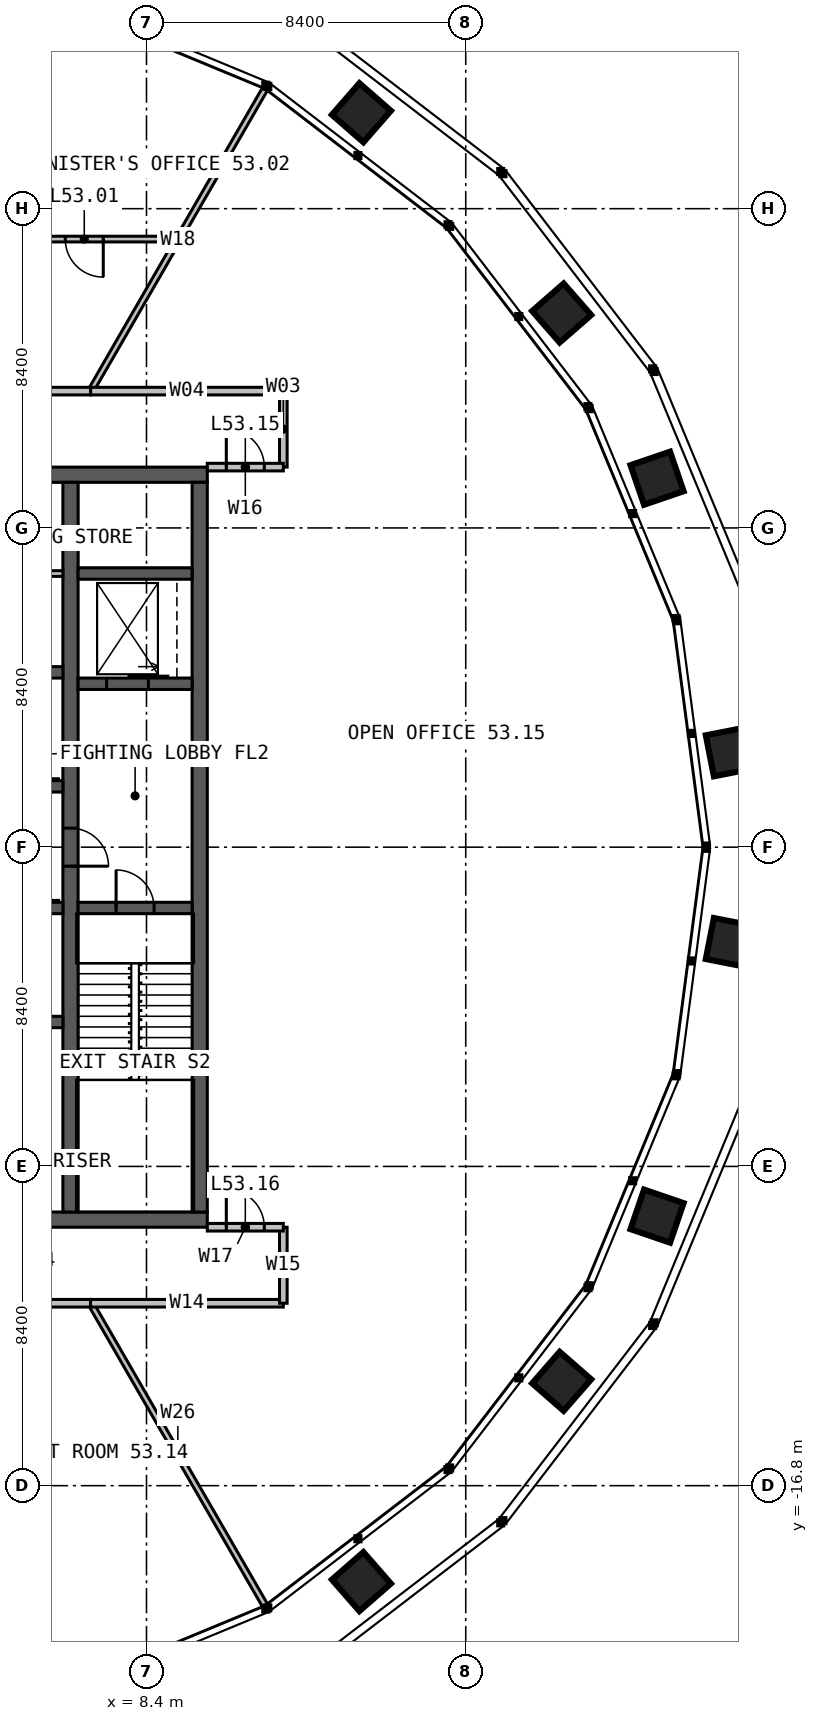
"""IFC4 building model, lengths in metres.
Left out: names, types, materials, properties, quantities, classifications, styles, units other than length and angle.
Written with IfcOpenShell. Run it as: python <this file> out.ifc"""

import sys

from ifc_helpers import new_model, si_unit, direction, frame, frame_2d, origin, place, context, subcontext, project, spatial, rectangle, extrude, element, fill, save


model = new_model("IFC4")
c1 = context("Model", 3, precision=1e-05, world=origin(), true_north=direction((0.0, 1.0)))
c2 = subcontext(c1, "Body", "Model", "MODEL_VIEW")
j1 = project(units=[si_unit("LENGTHUNIT", "METRE"), si_unit("PLANEANGLEUNIT", "RADIAN")], contexts=[c1])
p1 = place(None, origin())
s1 = spatial("IfcSite", under=j1, at=p1, CompositionType="ELEMENT")
p2 = place(p1, origin())
s2 = spatial("IfcBuilding", under=s1, at=p2, CompositionType="ELEMENT")
p3 = place(p2, frame((0.0, 0.0, 220.0)))
s3 = spatial("IfcBuildingStorey", under=s2, at=p3, CompositionType="ELEMENT", Elevation=220.0)
p4 = place(p3, frame((-10.0, 9.8, 0.0), z_axis=(0.0, 0.0, 1.0), x_axis=(1.0, 0.0, 0.0)))
e1 = element("IfcWall", 1, at=p4, inside=s3, PredefinedType="SOLIDWALL", context=c2, shape_type="SweptSolid", body=[
    extrude(rectangle(XDim=20.0, YDim=0.4, at=frame_2d((10.0, 0.0))), origin(), (0.0, 0.0, 1.0), 4.0),
])
p5 = place(p4, frame((9.4, 0.0, 0.0)))
e2 = element("IfcOpeningElement", 2, at=p5, cuts=e1, PredefinedType="OPENING", context=c2, shape_type="SweptSolid", body=[
    extrude(rectangle(XDim=1.2, YDim=2.2, at=frame_2d((0.6, 1.1))), frame((0.0, 0.21, 0.0), z_axis=(0.0, -1.0, 0.0), x_axis=(1.0, 0.0, 0.0)), (0.0, 0.0, 1.0), 0.42),
])
p6 = place(p3, frame((10.0, -9.8, 0.0), z_axis=(0.0, 0.0, 1.0), x_axis=(-1.0, 0.0, 0.0)))
e3 = element("IfcWall", 3, at=p6, inside=s3, PredefinedType="SOLIDWALL", context=c2, shape_type="SweptSolid", body=[
    extrude(rectangle(XDim=20.0, YDim=0.4, at=frame_2d((10.0, 0.0))), origin(), (0.0, 0.0, 1.0), 4.0),
])
p7 = place(p6, frame((6.875, 0.0, 0.0)))
e4 = element("IfcOpeningElement", 4, at=p7, cuts=e3, PredefinedType="OPENING", context=c2, shape_type="SweptSolid", body=[
    extrude(rectangle(XDim=1.2, YDim=2.2, at=frame_2d((0.6, 1.1))), frame((0.0, 0.21, 0.0), z_axis=(0.0, -1.0, 0.0), x_axis=(1.0, 0.0, 0.0)), (0.0, 0.0, 1.0), 0.42),
])
p8 = place(p3, frame((9.8, -9.6, 0.0), z_axis=(0.0, 0.0, 1.0), x_axis=(0.0, 1.0, 0.0)))
e5 = element("IfcWall", 5, at=p8, inside=s3, PredefinedType="SOLIDWALL", context=c2, shape_type="SweptSolid", body=[
    extrude(rectangle(XDim=19.2, YDim=0.4, at=frame_2d((9.6, 0.0))), origin(), (0.0, 0.0, 1.0), 4.0),
])
p9 = place(p3, frame((6.4, 9.6, 0.0), z_axis=(0.0, 0.0, 1.0), x_axis=(0.0, -1.0, 0.0)))
e6 = element("IfcWall", 6, at=p9, inside=s3, PredefinedType="SOLIDWALL", context=c2, shape_type="SweptSolid", body=[
    extrude(rectangle(XDim=19.2, YDim=0.4, at=frame_2d((9.6, 0.0))), origin(), (0.0, 0.0, 1.0), 4.0),
])
p10 = place(p9, frame((9.1, 0.0, 0.0)))
e7 = element("IfcOpeningElement", 7, at=p10, cuts=e6, PredefinedType="OPENING", context=c2, shape_type="SweptSolid", body=[
    extrude(rectangle(XDim=1.0, YDim=2.2, at=frame_2d((0.5, 1.1))), frame((0.0, 0.21, 0.0), z_axis=(0.0, -1.0, 0.0), x_axis=(1.0, 0.0, 0.0)), (0.0, 0.0, 1.0), 0.42),
])
p11 = place(p3, frame((1.35, 1.6, 0.0), z_axis=(0.0, 0.0, 1.0), x_axis=(1.0, 0.0, 0.0)))
e8 = element("IfcWall", 8, at=p11, inside=s3, PredefinedType="SOLIDWALL", context=c2, shape_type="SweptSolid", body=[
    extrude(rectangle(XDim=4.85, YDim=0.3, at=frame_2d((2.425, 0.0))), origin(), (0.0, 0.0, 1.0), 4.0),
])
p12 = place(p11, frame((0.6, 0.0, 0.0)))
e9 = element("IfcOpeningElement", 9, at=p12, cuts=e8, PredefinedType="OPENING", context=c2, shape_type="SweptSolid", body=[
    extrude(rectangle(XDim=1.1, YDim=2.2, at=frame_2d((0.55, 1.1))), frame((0.0, 0.16, 0.0), z_axis=(0.0, -1.0, 0.0), x_axis=(1.0, 0.0, 0.0)), (0.0, 0.0, 1.0), 0.32),
])
p13 = place(p11, frame((3.125, 0.0, 0.0)))
e10 = element("IfcOpeningElement", 10, at=p13, cuts=e8, PredefinedType="OPENING", context=c2, shape_type="SweptSolid", body=[
    extrude(rectangle(XDim=1.1, YDim=2.2, at=frame_2d((0.55, 1.1))), frame((0.0, 0.16, 0.0), z_axis=(0.0, -1.0, 0.0), x_axis=(1.0, 0.0, 0.0)), (0.0, 0.0, 1.0), 0.32),
])
p14 = place(p3, frame((1.35, 4.6, 0.0), z_axis=(0.0, 0.0, 1.0), x_axis=(1.0, 0.0, 0.0)))
e11 = element("IfcWall", 11, at=p14, inside=s3, PredefinedType="SOLIDWALL", context=c2, shape_type="SweptSolid", body=[
    extrude(rectangle(XDim=4.85, YDim=0.3, at=frame_2d((2.425, 0.0))), origin(), (0.0, 0.0, 1.0), 4.0),
])
p15 = place(p3, frame((3.85, -1.6, 0.0), z_axis=(0.0, 0.0, 1.0), x_axis=(1.0, 0.0, 0.0)))
e12 = element("IfcWall", 12, at=p15, inside=s3, PredefinedType="SOLIDWALL", context=c2, shape_type="SweptSolid", body=[
    extrude(rectangle(XDim=2.35, YDim=0.3, at=frame_2d((1.175, 0.0))), origin(), (0.0, 0.0, 1.0), 4.0),
])
p16 = place(p15, frame((0.625, 0.0, 0.0)))
e13 = element("IfcOpeningElement", 13, at=p16, cuts=e12, PredefinedType="OPENING", context=c2, shape_type="SweptSolid", body=[
    extrude(rectangle(XDim=1.1, YDim=2.2, at=frame_2d((0.55, 1.1))), frame((0.0, 0.16, 0.0), z_axis=(0.0, -1.0, 0.0), x_axis=(1.0, 0.0, 0.0)), (0.0, 0.0, 1.0), 0.32),
])
p17 = place(p3, frame((3.85, -4.6, 0.0), z_axis=(0.0, 0.0, 1.0), x_axis=(1.0, 0.0, 0.0)))
e14 = element("IfcWall", 14, at=p17, inside=s3, PredefinedType="SOLIDWALL", context=c2, shape_type="SweptSolid", body=[
    extrude(rectangle(XDim=2.35, YDim=0.3, at=frame_2d((1.175, 0.0))), origin(), (0.0, 0.0, 1.0), 4.0),
])
p18 = place(p3, frame((6.6, -1.6, 0.0), z_axis=(0.0, 0.0, 1.0), x_axis=(1.0, 0.0, 0.0)))
e15 = element("IfcWall", 15, at=p18, inside=s3, PredefinedType="SOLIDWALL", context=c2, shape_type="SweptSolid", body=[
    extrude(rectangle(XDim=3.0, YDim=0.3, at=frame_2d((1.5, 0.0))), origin(), (0.0, 0.0, 1.0), 4.0),
])
p19 = place(p18, frame((1.0, 0.0, 0.0)))
e16 = element("IfcOpeningElement", 16, at=p19, cuts=e15, PredefinedType="OPENING", context=c2, shape_type="SweptSolid", body=[
    extrude(rectangle(XDim=1.0, YDim=2.2, at=frame_2d((0.5, 1.1))), frame((0.0, 0.16, 0.0), z_axis=(0.0, -1.0, 0.0), x_axis=(1.0, 0.0, 0.0)), (0.0, 0.0, 1.0), 0.32),
])
p20 = place(p3, frame((6.6, 4.3, 0.0), z_axis=(0.0, 0.0, 1.0), x_axis=(1.0, 0.0, 0.0)))
e17 = element("IfcWall", 17, at=p20, inside=s3, PredefinedType="SOLIDWALL", context=c2, shape_type="SweptSolid", body=[
    extrude(rectangle(XDim=3.0, YDim=0.3, at=frame_2d((1.5, 0.0))), origin(), (0.0, 0.0, 1.0), 4.0),
])
p21 = place(p20, frame((0.75, 0.0, 0.0)))
e18 = element("IfcOpeningElement", 18, at=p21, cuts=e17, PredefinedType="OPENING", context=c2, shape_type="SweptSolid", body=[
    extrude(rectangle(XDim=1.1, YDim=2.2, at=frame_2d((0.55, 1.1))), frame((0.0, 0.16, 0.0), z_axis=(0.0, -1.0, 0.0), x_axis=(1.0, 0.0, 0.0)), (0.0, 0.0, 1.0), 0.32),
])
p22 = place(p3, frame((6.6, 7.2, 0.0), z_axis=(0.0, 0.0, 1.0), x_axis=(1.0, 0.0, 0.0)))
e19 = element("IfcWall", 19, at=p22, inside=s3, PredefinedType="SOLIDWALL", context=c2, shape_type="SweptSolid", body=[
    extrude(rectangle(XDim=3.0, YDim=0.3, at=frame_2d((1.5, 0.0))), origin(), (0.0, 0.0, 1.0), 4.0),
])
p23 = place(p3, frame((1.35, 7.2, 0.0), z_axis=(0.0, 0.0, 1.0), x_axis=(1.0, 0.0, 0.0)))
e20 = element("IfcWall", 20, at=p23, inside=s3, PredefinedType="PARTITIONING", context=c2, shape_type="SweptSolid", body=[
    extrude(rectangle(XDim=4.85, YDim=0.15, at=frame_2d((2.425, 0.0))), origin(), (0.0, 0.0, 1.0), 3.75),
])
p24 = place(p23, frame((3.45, 0.0, 0.0)))
e21 = element("IfcOpeningElement", 21, at=p24, cuts=e20, PredefinedType="OPENING", context=c2, shape_type="SweptSolid", body=[
    extrude(rectangle(XDim=0.9, YDim=2.2, at=frame_2d((0.45, 1.1))), frame((0.0, 0.085, 0.0), z_axis=(0.0, -1.0, 0.0), x_axis=(1.0, 0.0, 0.0)), (0.0, 0.0, 1.0), 0.17),
])
p25 = place(p3, frame((6.928, 12.0, 0.0), z_axis=(0.0, 0.0, 1.0), x_axis=(0.500006167237, 0.866021843099, 0.0)))
e22 = element("IfcWall", 22, at=p25, inside=s3, PredefinedType="PARTITIONING", context=c2, shape_type="SweptSolid", body=[
    extrude(rectangle(XDim=9.187, YDim=0.15, at=frame_2d((4.594, 0.0))), origin(), (0.0, 0.0, 1.0), 2.89),
])
p26 = place(p3, frame((3.215, -12.0, 0.0), z_axis=(0.0, 0.0, 1.0), x_axis=(0.258831459304, -0.965922499828, 0.0)))
e23 = element("IfcWall", 23, at=p26, inside=s3, PredefinedType="PARTITIONING", context=c2, shape_type="SweptSolid", body=[
    extrude(rectangle(XDim=10.62, YDim=0.15, at=frame_2d((5.31, 0.0))), origin(), (0.0, 0.0, 1.0), 2.89),
])
p27 = place(p3, frame((6.928, -12.0, 0.0), z_axis=(0.0, 0.0, 1.0), x_axis=(0.500006167237, -0.866021843099, 0.0)))
e24 = element("IfcWall", 24, at=p27, inside=s3, PredefinedType="PARTITIONING", context=c2, shape_type="SweptSolid", body=[
    extrude(rectangle(XDim=9.187, YDim=0.15, at=frame_2d((4.594, 0.0))), origin(), (0.0, 0.0, 1.0), 2.89),
])
p28 = place(p3, frame((12.0, 10.0, 0.0), z_axis=(0.0, 0.0, 1.0), x_axis=(0.0, 1.0, 0.0)))
e25 = element("IfcWall", 25, at=p28, inside=s3, PredefinedType="PARTITIONING", context=c2, shape_type="SweptSolid", body=[
    extrude(rectangle(XDim=2.0, YDim=0.2, at=frame_2d((1.0, 0.0))), origin(), (0.0, 0.0, 1.0), 3.8),
])
p29 = place(p3, frame((12.0, 12.0, 0.0), z_axis=(0.0, 0.0, 1.0), x_axis=(-1.0, 0.0, 0.0)))
e26 = element("IfcWall", 26, at=p29, inside=s3, PredefinedType="PARTITIONING", context=c2, shape_type="SweptSolid", body=[
    extrude(rectangle(XDim=5.072, YDim=0.2, at=frame_2d((2.536, 0.0))), origin(), (0.0, 0.0, 1.0), 3.8),
])
p30 = place(p3, frame((9.238, 16.0, 0.0), z_axis=(0.0, 0.0, 1.0), x_axis=(-1.0, 0.0, 0.0)))
e27 = element("IfcWall", 27, at=p30, inside=s3, PredefinedType="PARTITIONING", context=c2, shape_type="SweptSolid", body=[
    extrude(rectangle(XDim=18.475, YDim=0.15, at=frame_2d((9.238, 0.0))), origin(), (0.0, 0.0, 1.0), 2.89),
])
p31 = place(p30, frame((1.975, 0.0, 0.0)))
e28 = element("IfcOpeningElement", 28, at=p31, cuts=e27, PredefinedType="OPENING", context=c2, shape_type="SweptSolid", body=[
    extrude(rectangle(XDim=1.0, YDim=2.2, at=frame_2d((0.5, 1.1))), frame((0.0, 0.085, 0.0), z_axis=(0.0, -1.0, 0.0), x_axis=(1.0, 0.0, 0.0)), (0.0, 0.0, 1.0), 0.17),
])
p32 = place(p30, frame((8.338, 0.0, 0.0)))
e29 = element("IfcOpeningElement", 29, at=p32, cuts=e27, PredefinedType="OPENING", context=c2, shape_type="SweptSolid", body=[
    extrude(rectangle(XDim=1.8, YDim=2.2, at=frame_2d((0.9, 1.1))), frame((0.0, 0.085, 0.0), z_axis=(0.0, -1.0, 0.0), x_axis=(1.0, 0.0, 0.0)), (0.0, 0.0, 1.0), 0.17),
])
p33 = place(p30, frame((15.5, 0.0, 0.0)))
e30 = element("IfcOpeningElement", 30, at=p33, cuts=e27, PredefinedType="OPENING", context=c2, shape_type="SweptSolid", body=[
    extrude(rectangle(XDim=1.0, YDim=2.2, at=frame_2d((0.5, 1.1))), frame((0.0, 0.085, 0.0), z_axis=(0.0, -1.0, 0.0), x_axis=(1.0, 0.0, 0.0)), (0.0, 0.0, 1.0), 0.17),
])
p34 = place(p3, frame((4.287, 16.0, 0.0), z_axis=(0.0, 0.0, 1.0), x_axis=(0.258842191576, 0.965919623913, 0.0)))
e31 = element("IfcWall", 31, at=p34, inside=s3, PredefinedType="PARTITIONING", context=c2, shape_type="SweptSolid", body=[
    extrude(rectangle(XDim=6.479, YDim=0.15, at=frame_2d((3.239, 0.0))), origin(), (0.0, 0.0, 1.0), 2.89),
])
p35 = place(p3, frame((6.928, 12.0, 0.0), z_axis=(0.0, 0.0, 1.0), x_axis=(-1.0, 0.0, 0.0)))
e32 = element("IfcWall", 32, at=p35, inside=s3, PredefinedType="PARTITIONING", context=c2, shape_type="SweptSolid", body=[
    extrude(rectangle(XDim=13.856, YDim=0.2, at=frame_2d((6.928, 0.0))), origin(), (0.0, 0.0, 1.0), 3.8),
])
p36 = place(p35, frame((6.028, 0.0, 0.0)))
e33 = element("IfcOpeningElement", 33, at=p36, cuts=e32, PredefinedType="OPENING", context=c2, shape_type="SweptSolid", body=[
    extrude(rectangle(XDim=1.8, YDim=2.2, at=frame_2d((0.9, 1.1))), frame((0.0, 0.11, 0.0), z_axis=(0.0, -1.0, 0.0), x_axis=(1.0, 0.0, 0.0)), (0.0, 0.0, 1.0), 0.22),
])
p37 = place(p3, frame((3.215, -12.0, 0.0), z_axis=(0.0, 0.0, 1.0), x_axis=(1.0, 0.0, 0.0)))
e34 = element("IfcWall", 34, at=p37, inside=s3, PredefinedType="PARTITIONING", context=c2, shape_type="SweptSolid", body=[
    extrude(rectangle(XDim=3.713, YDim=0.2, at=frame_2d((1.856, 0.0))), origin(), (0.0, 0.0, 1.0), 3.8),
])
p38 = place(p37, frame((1.356, 0.0, 0.0)))
e35 = element("IfcOpeningElement", 35, at=p38, cuts=e34, PredefinedType="OPENING", context=c2, shape_type="SweptSolid", body=[
    extrude(rectangle(XDim=1.0, YDim=2.2, at=frame_2d((0.5, 1.1))), frame((0.0, 0.11, 0.0), z_axis=(0.0, -1.0, 0.0), x_axis=(1.0, 0.0, 0.0)), (0.0, 0.0, 1.0), 0.22),
])
p39 = place(p3, frame((6.928, -12.0, 0.0), z_axis=(0.0, 0.0, 1.0), x_axis=(1.0, 0.0, 0.0)))
e36 = element("IfcWall", 36, at=p39, inside=s3, PredefinedType="PARTITIONING", context=c2, shape_type="SweptSolid", body=[
    extrude(rectangle(XDim=5.072, YDim=0.2, at=frame_2d((2.536, 0.0))), origin(), (0.0, 0.0, 1.0), 3.8),
])
p40 = place(p3, frame((12.0, -12.0, 0.0), z_axis=(0.0, 0.0, 1.0), x_axis=(0.0, 1.0, 0.0)))
e37 = element("IfcWall", 37, at=p40, inside=s3, PredefinedType="PARTITIONING", context=c2, shape_type="SweptSolid", body=[
    extrude(rectangle(XDim=2.0, YDim=0.2, at=frame_2d((1.0, 0.0))), origin(), (0.0, 0.0, 1.0), 3.8),
])
p41 = place(p3, frame((10.0, 10.0, 0.0), z_axis=(0.0, 0.0, 1.0), x_axis=(1.0, 0.0, 0.0)))
e38 = element("IfcWall", 38, at=p41, inside=s3, PredefinedType="PARTITIONING", context=c2, shape_type="SweptSolid", body=[
    extrude(rectangle(XDim=2.0, YDim=0.2, at=frame_2d((1.0, 0.0))), origin(), (0.0, 0.0, 1.0), 3.8),
])
p42 = place(p41, frame((0.5, 0.0, 0.0)))
e39 = element("IfcOpeningElement", 39, at=p42, cuts=e38, PredefinedType="OPENING", context=c2, shape_type="SweptSolid", body=[
    extrude(rectangle(XDim=1.0, YDim=2.2, at=frame_2d((0.5, 1.1))), frame((0.0, 0.11, 0.0), z_axis=(0.0, -1.0, 0.0), x_axis=(1.0, 0.0, 0.0)), (0.0, 0.0, 1.0), 0.22),
])
p43 = place(p3, frame((10.0, -10.0, 0.0), z_axis=(0.0, 0.0, 1.0), x_axis=(1.0, 0.0, 0.0)))
e40 = element("IfcWall", 40, at=p43, inside=s3, PredefinedType="PARTITIONING", context=c2, shape_type="SweptSolid", body=[
    extrude(rectangle(XDim=2.0, YDim=0.2, at=frame_2d((1.0, 0.0))), origin(), (0.0, 0.0, 1.0), 3.8),
])
p44 = place(p43, frame((0.5, 0.0, 0.0)))
e41 = element("IfcOpeningElement", 41, at=p44, cuts=e40, PredefinedType="OPENING", context=c2, shape_type="SweptSolid", body=[
    extrude(rectangle(XDim=1.0, YDim=2.2, at=frame_2d((0.5, 1.1))), frame((0.0, 0.11, 0.0), z_axis=(0.0, -1.0, 0.0), x_axis=(1.0, 0.0, 0.0)), (0.0, 0.0, 1.0), 0.22),
])
p45 = place(p10, origin())
e42 = element("IfcDoor", 42, at=p45, inside=s3, OperationType="SINGLE_SWING_RIGHT", PredefinedType="DOOR", context=c2, shape_type="SweptSolid", body=[
    extrude(rectangle(XDim=1.0, YDim=2.2, at=frame_2d((0.5, 1.1))), frame((0.0, 0.025, 0.0), z_axis=(0.0, -1.0, 0.0), x_axis=(1.0, 0.0, 0.0)), (0.0, 0.0, 1.0), 0.05),
])
fill(e7, e42)
p46 = place(p19, origin())
e43 = element("IfcDoor", 43, at=p46, inside=s3, OperationType="SINGLE_SWING_LEFT", PredefinedType="DOOR", context=c2, shape_type="SweptSolid", body=[
    extrude(rectangle(XDim=1.0, YDim=2.2, at=frame_2d((0.5, 1.1))), frame((0.0, 0.025, 0.0), z_axis=(0.0, -1.0, 0.0), x_axis=(1.0, 0.0, 0.0)), (0.0, 0.0, 1.0), 0.05),
])
fill(e16, e43)
p47 = place(p21, origin())
e44 = element("IfcDoor", 44, at=p47, inside=s3, OperationType="SLIDING_TO_LEFT", PredefinedType="DOOR", context=c2, shape_type="SweptSolid", body=[
    extrude(rectangle(XDim=1.1, YDim=2.2, at=frame_2d((0.55, 1.1))), frame((0.0, 0.025, 0.0), z_axis=(0.0, -1.0, 0.0), x_axis=(1.0, 0.0, 0.0)), (0.0, 0.0, 1.0), 0.05),
])
fill(e18, e44)
p48 = place(p31, origin())
e45 = element("IfcDoor", 45, at=p48, inside=s3, OperationType="SINGLE_SWING_LEFT", PredefinedType="DOOR", context=c2, shape_type="SweptSolid", body=[
    extrude(rectangle(XDim=1.0, YDim=2.2, at=frame_2d((0.5, 1.1))), frame((0.0, 0.025, 0.0), z_axis=(0.0, -1.0, 0.0), x_axis=(1.0, 0.0, 0.0)), (0.0, 0.0, 1.0), 0.05),
])
fill(e28, e45)
p49 = place(p42, origin())
e46 = element("IfcDoor", 46, at=p49, inside=s3, OperationType="SINGLE_SWING_LEFT", PredefinedType="DOOR", context=c2, shape_type="SweptSolid", body=[
    extrude(rectangle(XDim=1.0, YDim=2.2, at=frame_2d((0.5, 1.1))), frame((0.0, 0.025, 0.0), z_axis=(0.0, -1.0, 0.0), x_axis=(1.0, 0.0, 0.0)), (0.0, 0.0, 1.0), 0.05),
])
fill(e39, e46)
p50 = place(p44, origin())
e47 = element("IfcDoor", 47, at=p50, inside=s3, OperationType="SINGLE_SWING_LEFT", PredefinedType="DOOR", context=c2, shape_type="SweptSolid", body=[
    extrude(rectangle(XDim=1.0, YDim=2.2, at=frame_2d((0.5, 1.1))), frame((0.0, 0.025, 0.0), z_axis=(0.0, -1.0, 0.0), x_axis=(1.0, 0.0, 0.0)), (0.0, 0.0, 1.0), 0.05),
])
fill(e41, e47)
save(model, sys.argv[1])
